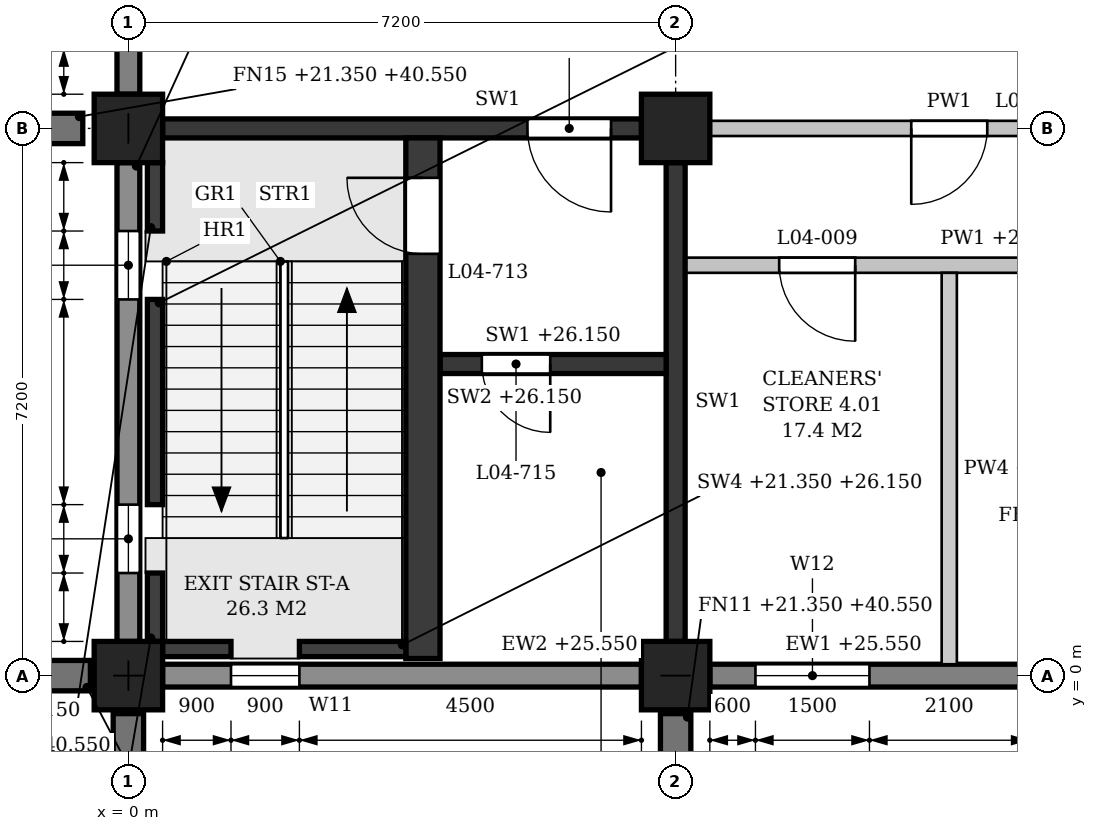
"""IFC4 building model, lengths in metres.
Left out: names, types, materials, properties, quantities, classifications, styles, units other than length and angle.
Written with IfcOpenShell. Run it as: python <this file> out.ifc"""

import sys

from ifc_helpers import new_model, si_unit, direction, frame, frame_2d, origin, origin_2d, place, context, subcontext, project, spatial, polyline, rectangle, outline, extrude, element, fill, save


model = new_model("IFC4")
c1 = context("Model", 3, precision=1e-05, world=origin(), true_north=direction((0.0, 1.0)))
c2 = subcontext(c1, "Body", "Model", "MODEL_VIEW")
j1 = project(units=[si_unit("LENGTHUNIT", "METRE"), si_unit("PLANEANGLEUNIT", "RADIAN")], contexts=[c1])
p1 = place(None, origin())
s1 = spatial("IfcSite", under=j1, at=p1, CompositionType="ELEMENT")
p2 = place(p1, origin())
s2 = spatial("IfcBuilding", under=s1, at=p2, CompositionType="ELEMENT")
p3 = place(p2, frame((0.0, 0.0, 21.6)))
s3 = spatial("IfcBuildingStorey", under=s2, at=p3, CompositionType="ELEMENT", Elevation=21.6)
for number, where, z_axis, x_axis in (
    (1, (0.0, 0.0, 0.0), (0.0, 0.0, 1.0), (1.0, 0.0, 0.0)),
    (2, (0.0, 7.2, 0.0), (0.0, 0.0, 1.0), (1.0, 0.0, 0.0)),
    (3, (7.2, 0.0, 0.0), (0.0, 0.0, 1.0), (1.0, 0.0, 0.0)),
    (4, (7.2, 7.2, 0.0), (0.0, 0.0, 1.0), (1.0, 0.0, 0.0)),
):
    element("IfcColumn", number, at=place(p3, frame(where, z_axis=z_axis, x_axis=x_axis)), inside=s3, PredefinedType="COLUMN", context=c2, shape_type="SweptSolid", body=[
        extrude(rectangle(XDim=0.9, YDim=0.9, at=origin_2d()), origin(), (0.0, 0.0, 1.0), 4.8),
    ])
p4 = place(p3, frame((0.0, 0.45, 0.0), z_axis=(0.0, 0.0, 1.0), x_axis=(0.0, 1.0, 0.0)))
e5 = element("IfcWall", 5, at=p4, inside=s3, PredefinedType="STANDARD", context=c2, shape_type="SweptSolid", body=[
    extrude(rectangle(XDim=6.3, YDim=0.3, at=frame_2d((3.15, 0.0))), origin(), (0.0, 0.0, 1.0), 3.95),
])
p5 = place(p4, frame((0.9, 0.0, 0.9)))
e6 = element("IfcOpeningElement", 6, at=p5, cuts=e5, PredefinedType="OPENING", context=c2, shape_type="SweptSolid", body=[
    extrude(outline(polyline([(0.0, 0.0), (0.9, 0.0), (0.9, 2.05), (0.45, 2.5), (0.0, 2.05), (0.0, 0.0)])), frame((0.0, 0.16, 0.0), z_axis=(0.0, -1.0, 0.0), x_axis=(1.0, 0.0, 0.0)), (0.0, 0.0, 1.0), 0.32),
])
p6 = place(p4, frame((4.5, 0.0, 0.9)))
e7 = element("IfcOpeningElement", 7, at=p6, cuts=e5, PredefinedType="OPENING", context=c2, shape_type="SweptSolid", body=[
    extrude(outline(polyline([(0.0, 0.0), (0.9, 0.0), (0.9, 2.05), (0.45, 2.5), (0.0, 2.05), (0.0, 0.0)])), frame((0.0, 0.16, 0.0), z_axis=(0.0, -1.0, 0.0), x_axis=(1.0, 0.0, 0.0)), (0.0, 0.0, 1.0), 0.32),
])
p7 = place(p3, frame((0.0, 7.65, 0.0), z_axis=(0.0, 0.0, 1.0), x_axis=(0.0, 1.0, 0.0)))
e8 = element("IfcWall", 8, at=p7, inside=s3, PredefinedType="STANDARD", context=c2, shape_type="SweptSolid", body=[
    extrude(rectangle(XDim=6.3, YDim=0.3, at=frame_2d((3.15, 0.0))), origin(), (0.0, 0.0, 1.0), 3.95),
])
p8 = place(p7, frame((0.6, 0.0, 0.9)))
e9 = element("IfcOpeningElement", 9, at=p8, cuts=e8, PredefinedType="OPENING", context=c2, shape_type="SweptSolid", body=[
    extrude(outline(polyline([(0.0, 0.0), (1.5, 0.0), (1.5, 1.75), (0.75, 2.5), (0.0, 1.75), (0.0, 0.0)])), frame((0.0, 0.16, 0.0), z_axis=(0.0, -1.0, 0.0), x_axis=(1.0, 0.0, 0.0)), (0.0, 0.0, 1.0), 0.32),
])
p9 = place(p7, frame((4.2, 0.0, 0.9)))
e10 = element("IfcOpeningElement", 10, at=p9, cuts=e8, PredefinedType="OPENING", context=c2, shape_type="SweptSolid", body=[
    extrude(outline(polyline([(0.0, 0.0), (1.5, 0.0), (1.5, 1.75), (0.75, 2.5), (0.0, 1.75), (0.0, 0.0)])), frame((0.0, 0.16, 0.0), z_axis=(0.0, -1.0, 0.0), x_axis=(1.0, 0.0, 0.0)), (0.0, 0.0, 1.0), 0.32),
])
p10 = place(p3, frame((0.45, 0.0, 0.0), z_axis=(0.0, 0.0, 1.0), x_axis=(1.0, 0.0, 0.0)))
e11 = element("IfcWall", 11, at=p10, inside=s3, PredefinedType="STANDARD", context=c2, shape_type="SweptSolid", body=[
    extrude(rectangle(XDim=6.3, YDim=0.3, at=frame_2d((3.15, 0.0))), origin(), (0.0, 0.0, 1.0), 3.95),
])
p11 = place(p10, frame((0.9, 0.0, 0.9)))
e12 = element("IfcOpeningElement", 12, at=p11, cuts=e11, PredefinedType="OPENING", context=c2, shape_type="SweptSolid", body=[
    extrude(outline(polyline([(0.0, 0.0), (0.9, 0.0), (0.9, 2.05), (0.45, 2.5), (0.0, 2.05), (0.0, 0.0)])), frame((0.0, 0.16, 0.0), z_axis=(0.0, -1.0, 0.0), x_axis=(1.0, 0.0, 0.0)), (0.0, 0.0, 1.0), 0.32),
])
p12 = place(p3, frame((7.65, 0.0, 0.0), z_axis=(0.0, 0.0, 1.0), x_axis=(1.0, 0.0, 0.0)))
e13 = element("IfcWall", 13, at=p12, inside=s3, PredefinedType="STANDARD", context=c2, shape_type="SweptSolid", body=[
    extrude(rectangle(XDim=6.3, YDim=0.3, at=frame_2d((3.15, 0.0))), origin(), (0.0, 0.0, 1.0), 3.95),
])
p13 = place(p12, frame((0.6, 0.0, 0.9)))
e14 = element("IfcOpeningElement", 14, at=p13, cuts=e13, PredefinedType="OPENING", context=c2, shape_type="SweptSolid", body=[
    extrude(outline(polyline([(0.0, 0.0), (1.5, 0.0), (1.5, 1.75), (0.75, 2.5), (0.0, 1.75), (0.0, 0.0)])), frame((0.0, 0.16, 0.0), z_axis=(0.0, -1.0, 0.0), x_axis=(1.0, 0.0, 0.0)), (0.0, 0.0, 1.0), 0.32),
])
p14 = place(p12, frame((4.2, 0.0, 0.9)))
e15 = element("IfcOpeningElement", 15, at=p14, cuts=e13, PredefinedType="OPENING", context=c2, shape_type="SweptSolid", body=[
    extrude(outline(polyline([(0.0, 0.0), (1.5, 0.0), (1.5, 1.75), (0.75, 2.5), (0.0, 1.75), (0.0, 0.0)])), frame((0.0, 0.16, 0.0), z_axis=(0.0, -1.0, 0.0), x_axis=(1.0, 0.0, 0.0)), (0.0, 0.0, 1.0), 0.32),
])
for number, where, z_axis, x_axis in (
    (16, (-0.5, 0.0, -0.25), (0.0, 0.0, 1.0), (-1.0, 0.0, 0.0)),
    (17, (0.0, -0.5, -0.25), (0.0, 0.0, 1.0), (0.0, -1.0, 0.0)),
    (18, (-0.6, 7.2, -0.25), (0.0, 0.0, 1.0), (-1.0, 0.0, 0.0)),
    (19, (7.2, -0.5, -0.25), (0.0, 0.0, 1.0), (0.0, -1.0, 0.0)),
):
    element("IfcWall", number, at=place(p3, frame(where, z_axis=z_axis, x_axis=x_axis)), inside=s3, PredefinedType="POLYGONAL", context=c2, shape_type="SweptSolid", body=[
        extrude(outline(polyline([(0.85, 0.0), (0.85, 18.9), (0.65, 19.2), (0.0, 19.2), (0.0, 0.0), (0.85, 0.0)])), frame((0.0, 0.2, 0.0), z_axis=(0.0, -1.0, 0.0), x_axis=(1.0, 0.0, 0.0)), (0.0, 0.0, 1.0), 0.4),
    ])
p15 = place(p3, frame((0.45, 7.2, 0.0), z_axis=(0.0, 0.0, 1.0), x_axis=(1.0, 0.0, 0.0)))
e20 = element("IfcWall", 20, at=p15, inside=s3, PredefinedType="SHEAR", context=c2, shape_type="SweptSolid", body=[
    extrude(rectangle(XDim=6.3, YDim=0.25, at=frame_2d((3.15, 0.0))), origin(), (0.0, 0.0, 1.0), 3.8),
])
p16 = place(p15, frame((4.8, 0.0, 0.0)))
e21 = element("IfcOpeningElement", 21, at=p16, cuts=e20, PredefinedType="OPENING", context=c2, shape_type="SweptSolid", body=[
    extrude(rectangle(XDim=1.1, YDim=2.1, at=frame_2d((0.55, 1.05))), frame((0.0, 0.135, 0.0), z_axis=(0.0, -1.0, 0.0), x_axis=(1.0, 0.0, 0.0)), (0.0, 0.0, 1.0), 0.27),
])
p17 = place(p3, frame((7.2, 0.45, 0.0), z_axis=(0.0, 0.0, 1.0), x_axis=(0.0, 1.0, 0.0)))
e22 = element("IfcWall", 22, at=p17, inside=s3, PredefinedType="SHEAR", context=c2, shape_type="SweptSolid", body=[
    extrude(rectangle(XDim=6.3, YDim=0.25, at=frame_2d((3.15, 0.0))), origin(), (0.0, 0.0, 1.0), 3.8),
])
p18 = place(p3, frame((0.35, 0.45, -0.25), z_axis=(0.0, 0.0, 1.0), x_axis=(0.0, 1.0, 0.0)))
e23 = element("IfcWall", 23, at=p18, inside=s3, PredefinedType="SHEAR", context=c2, shape_type="SweptSolid", body=[
    extrude(rectangle(XDim=0.9, YDim=0.2, at=frame_2d((0.45, 0.0))), origin(), (0.0, 0.0, 1.0), 4.8),
])
p19 = place(p3, frame((0.35, 2.25, -0.25), z_axis=(0.0, 0.0, 1.0), x_axis=(0.0, 1.0, 0.0)))
e24 = element("IfcWall", 24, at=p19, inside=s3, PredefinedType="SHEAR", context=c2, shape_type="SweptSolid", body=[
    extrude(rectangle(XDim=2.7, YDim=0.2, at=frame_2d((1.35, 0.0))), origin(), (0.0, 0.0, 1.0), 4.8),
])
p20 = place(p3, frame((0.35, 5.85, -0.25), z_axis=(0.0, 0.0, 1.0), x_axis=(0.0, 1.0, 0.0)))
e25 = element("IfcWall", 25, at=p20, inside=s3, PredefinedType="SHEAR", context=c2, shape_type="SweptSolid", body=[
    extrude(rectangle(XDim=0.9, YDim=0.2, at=frame_2d((0.45, 0.0))), origin(), (0.0, 0.0, 1.0), 4.8),
])
p21 = place(p3, frame((0.45, 0.35, -0.25), z_axis=(0.0, 0.0, 1.0), x_axis=(1.0, 0.0, 0.0)))
e26 = element("IfcWall", 26, at=p21, inside=s3, PredefinedType="SHEAR", context=c2, shape_type="SweptSolid", body=[
    extrude(rectangle(XDim=0.9, YDim=0.2, at=frame_2d((0.45, 0.0))), origin(), (0.0, 0.0, 1.0), 4.8),
])
p22 = place(p3, frame((2.25, 0.35, -0.25), z_axis=(0.0, 0.0, 1.0), x_axis=(1.0, 0.0, 0.0)))
e27 = element("IfcWall", 27, at=p22, inside=s3, PredefinedType="SHEAR", context=c2, shape_type="SweptSolid", body=[
    extrude(rectangle(XDim=1.4, YDim=0.2, at=frame_2d((0.7, 0.0))), origin(), (0.0, 0.0, 1.0), 4.8),
])
p23 = place(p3, frame((3.875, 0.225, 0.0), z_axis=(0.0, 0.0, 1.0), x_axis=(0.0, 1.0, 0.0)))
e28 = element("IfcWall", 28, at=p23, inside=s3, PredefinedType="SHEAR", context=c2, shape_type="SweptSolid", body=[
    extrude(rectangle(XDim=6.85, YDim=0.45, at=frame_2d((3.425, 0.0))), origin(), (0.0, 0.0, 1.0), 4.55),
])
p24 = place(p23, frame((5.325, 0.0, 0.0)))
e29 = element("IfcOpeningElement", 29, at=p24, cuts=e28, PredefinedType="OPENING", context=c2, shape_type="SweptSolid", body=[
    extrude(rectangle(XDim=1.0, YDim=2.1, at=frame_2d((0.5, 1.05))), frame((0.0, 0.235, 0.0), z_axis=(0.0, -1.0, 0.0), x_axis=(1.0, 0.0, 0.0)), (0.0, 0.0, 1.0), 0.47),
])
p25 = place(p3, frame((4.1, 4.1, 0.0), z_axis=(0.0, 0.0, 1.0), x_axis=(1.0, 0.0, 0.0)))
e30 = element("IfcWall", 30, at=p25, inside=s3, PredefinedType="SHEAR", context=c2, shape_type="SweptSolid", body=[
    extrude(rectangle(XDim=2.975, YDim=0.25, at=frame_2d((1.487, 0.0))), origin(), (0.0, 0.0, 1.0), 4.55),
])
p26 = place(p25, frame((0.55, 0.0, 0.0)))
e31 = element("IfcOpeningElement", 31, at=p26, cuts=e30, PredefinedType="OPENING", context=c2, shape_type="SweptSolid", body=[
    extrude(rectangle(XDim=0.9, YDim=2.1, at=frame_2d((0.45, 1.05))), frame((0.0, 0.135, 0.0), z_axis=(0.0, -1.0, 0.0), x_axis=(1.0, 0.0, 0.0)), (0.0, 0.0, 1.0), 0.27),
])
p27 = place(p3, frame((7.325, 5.4, 0.0), z_axis=(0.0, 0.0, 1.0), x_axis=(1.0, 0.0, 0.0)))
e32 = element("IfcWall", 32, at=p27, inside=s3, PredefinedType="PARTITIONING", context=c2, shape_type="SweptSolid", body=[
    extrude(outline(polyline([(0.0, 0.0), (14.15, 0.0), (14.15, 3.8), (14.025, 3.8), (14.025, 4.55), (7.325, 4.55), (7.325, 3.8), (6.825, 3.8), (6.825, 4.55), (0.125, 4.55), (0.125, 3.8), (0.0, 3.8), (0.0, 0.0)])), frame((0.0, 0.1, 0.0), z_axis=(0.0, -1.0, 0.0), x_axis=(1.0, 0.0, 0.0)), (0.0, 0.0, 1.0), 0.2),
])
p28 = place(p27, frame((1.238, 0.0, 0.0)))
e33 = element("IfcOpeningElement", 33, at=p28, cuts=e32, PredefinedType="OPENING", context=c2, shape_type="SweptSolid", body=[
    extrude(rectangle(XDim=1.0, YDim=2.1, at=frame_2d((0.5, 1.05))), frame((0.0, 0.11, 0.0), z_axis=(0.0, -1.0, 0.0), x_axis=(1.0, 0.0, 0.0)), (0.0, 0.0, 1.0), 0.22),
])
p29 = place(p27, frame((4.775, 0.0, 0.0)))
e34 = element("IfcOpeningElement", 34, at=p29, cuts=e32, PredefinedType="OPENING", context=c2, shape_type="SweptSolid", body=[
    extrude(rectangle(XDim=1.0, YDim=2.1, at=frame_2d((0.5, 1.05))), frame((0.0, 0.11, 0.0), z_axis=(0.0, -1.0, 0.0), x_axis=(1.0, 0.0, 0.0)), (0.0, 0.0, 1.0), 0.22),
])
p30 = place(p27, frame((8.375, 0.0, 0.0)))
e35 = element("IfcOpeningElement", 35, at=p30, cuts=e32, PredefinedType="OPENING", context=c2, shape_type="SweptSolid", body=[
    extrude(rectangle(XDim=1.0, YDim=2.1, at=frame_2d((0.5, 1.05))), frame((0.0, 0.11, 0.0), z_axis=(0.0, -1.0, 0.0), x_axis=(1.0, 0.0, 0.0)), (0.0, 0.0, 1.0), 0.22),
])
p31 = place(p27, frame((11.913, 0.0, 0.0)))
e36 = element("IfcOpeningElement", 36, at=p31, cuts=e32, PredefinedType="OPENING", context=c2, shape_type="SweptSolid", body=[
    extrude(rectangle(XDim=1.0, YDim=2.1, at=frame_2d((0.5, 1.05))), frame((0.0, 0.11, 0.0), z_axis=(0.0, -1.0, 0.0), x_axis=(1.0, 0.0, 0.0)), (0.0, 0.0, 1.0), 0.22),
])
p32 = place(p3, frame((7.65, 7.2, 0.0), z_axis=(0.0, 0.0, 1.0), x_axis=(1.0, 0.0, 0.0)))
e37 = element("IfcWall", 37, at=p32, inside=s3, PredefinedType="PARTITIONING", context=c2, shape_type="SweptSolid", body=[
    extrude(rectangle(XDim=6.3, YDim=0.2, at=frame_2d((3.15, 0.0))), origin(), (0.0, 0.0, 1.0), 3.8),
])
p33 = place(p32, frame((2.65, 0.0, 0.0)))
e38 = element("IfcOpeningElement", 38, at=p33, cuts=e37, PredefinedType="OPENING", context=c2, shape_type="SweptSolid", body=[
    extrude(rectangle(XDim=1.0, YDim=2.1, at=frame_2d((0.5, 1.05))), frame((0.0, 0.11, 0.0), z_axis=(0.0, -1.0, 0.0), x_axis=(1.0, 0.0, 0.0)), (0.0, 0.0, 1.0), 0.22),
])
p34 = place(p3, frame((10.8, 0.15, 0.0), z_axis=(0.0, 0.0, 1.0), x_axis=(0.0, 1.0, 0.0)))
e39 = element("IfcWall", 39, at=p34, inside=s3, PredefinedType="PARTITIONING", context=c2, shape_type="SweptSolid", body=[
    extrude(outline(polyline([(0.0, 0.0), (5.15, 0.0), (5.15, 4.55), (0.1, 4.55), (0.1, 3.95), (0.0, 3.95), (0.0, 0.0)])), frame((0.0, 0.1, 0.0), z_axis=(0.0, -1.0, 0.0), x_axis=(1.0, 0.0, 0.0)), (0.0, 0.0, 1.0), 0.2),
])
p35 = place(p11, origin())
e40 = element("IfcWindow", 40, at=p35, inside=s3, PartitioningType="SINGLE_PANEL", PredefinedType="WINDOW", context=c2, shape_type="SweptSolid", body=[
    extrude(outline(polyline([(0.0, 0.0), (0.9, 0.0), (0.9, 2.05), (0.45, 2.5), (0.0, 2.05), (0.0, 0.0)])), frame((0.0, 0.03, 0.0), z_axis=(0.0, -1.0, 0.0), x_axis=(1.0, 0.0, 0.0)), (0.0, 0.0, 1.0), 0.06),
])
fill(e12, e40)
p36 = place(p13, origin())
e41 = element("IfcWindow", 41, at=p36, inside=s3, PartitioningType="SINGLE_PANEL", PredefinedType="WINDOW", context=c2, shape_type="SweptSolid", body=[
    extrude(outline(polyline([(0.0, 0.0), (1.5, 0.0), (1.5, 1.75), (0.75, 2.5), (0.0, 1.75), (0.0, 0.0)])), frame((0.0, 0.03, 0.0), z_axis=(0.0, -1.0, 0.0), x_axis=(1.0, 0.0, 0.0)), (0.0, 0.0, 1.0), 0.06),
])
fill(e14, e41)
p37 = place(p5, origin())
e42 = element("IfcWindow", 42, at=p37, inside=s3, PartitioningType="SINGLE_PANEL", PredefinedType="WINDOW", context=c2, shape_type="SweptSolid", body=[
    extrude(outline(polyline([(0.0, 0.0), (0.9, 0.0), (0.9, 2.05), (0.45, 2.5), (0.0, 2.05), (0.0, 0.0)])), frame((0.0, 0.03, 0.0), z_axis=(0.0, -1.0, 0.0), x_axis=(1.0, 0.0, 0.0)), (0.0, 0.0, 1.0), 0.06),
])
fill(e6, e42)
p38 = place(p6, origin())
e43 = element("IfcWindow", 43, at=p38, inside=s3, PartitioningType="SINGLE_PANEL", PredefinedType="WINDOW", context=c2, shape_type="SweptSolid", body=[
    extrude(outline(polyline([(0.0, 0.0), (0.9, 0.0), (0.9, 2.05), (0.45, 2.5), (0.0, 2.05), (0.0, 0.0)])), frame((0.0, 0.03, 0.0), z_axis=(0.0, -1.0, 0.0), x_axis=(1.0, 0.0, 0.0)), (0.0, 0.0, 1.0), 0.06),
])
fill(e7, e43)
p39 = place(p24, origin())
e44 = element("IfcDoor", 44, at=p39, inside=s3, OperationType="SINGLE_SWING_RIGHT", PredefinedType="DOOR", context=c2, shape_type="SweptSolid", body=[
    extrude(rectangle(XDim=1.0, YDim=2.1, at=frame_2d((0.5, 1.05))), frame((0.0, 0.025, 0.0), z_axis=(0.0, -1.0, 0.0), x_axis=(1.0, 0.0, 0.0)), (0.0, 0.0, 1.0), 0.05),
])
fill(e29, e44)
p40 = place(p16, frame((1.1, 0.0, 0.0), z_axis=(0.0, 0.0, 1.0), x_axis=(-1.0, 0.0, 0.0)))
e45 = element("IfcDoor", 45, at=p40, inside=s3, OperationType="SINGLE_SWING_LEFT", PredefinedType="DOOR", context=c2, shape_type="SweptSolid", body=[
    extrude(rectangle(XDim=1.1, YDim=2.1, at=frame_2d((0.55, 1.05))), frame((0.0, 0.025, 0.0), z_axis=(0.0, -1.0, 0.0), x_axis=(1.0, 0.0, 0.0)), (0.0, 0.0, 1.0), 0.05),
])
fill(e21, e45)
p41 = place(p26, frame((0.9, 0.0, 0.0), z_axis=(0.0, 0.0, 1.0), x_axis=(-1.0, 0.0, 0.0)))
e46 = element("IfcDoor", 46, at=p41, inside=s3, OperationType="SINGLE_SWING_LEFT", PredefinedType="DOOR", context=c2, shape_type="SweptSolid", body=[
    extrude(rectangle(XDim=0.9, YDim=2.1, at=frame_2d((0.45, 1.05))), frame((0.0, 0.025, 0.0), z_axis=(0.0, -1.0, 0.0), x_axis=(1.0, 0.0, 0.0)), (0.0, 0.0, 1.0), 0.05),
])
fill(e31, e46)
p42 = place(p33, frame((1.0, 0.0, 0.0), z_axis=(0.0, 0.0, 1.0), x_axis=(-1.0, 0.0, 0.0)))
e47 = element("IfcDoor", 47, at=p42, inside=s3, OperationType="SINGLE_SWING_RIGHT", PredefinedType="DOOR", context=c2, shape_type="SweptSolid", body=[
    extrude(rectangle(XDim=1.0, YDim=2.1, at=frame_2d((0.5, 1.05))), frame((0.0, 0.025, 0.0), z_axis=(0.0, -1.0, 0.0), x_axis=(1.0, 0.0, 0.0)), (0.0, 0.0, 1.0), 0.05),
])
fill(e38, e47)
p43 = place(p28, frame((1.0, 0.0, 0.0), z_axis=(0.0, 0.0, 1.0), x_axis=(-1.0, 0.0, 0.0)))
e48 = element("IfcDoor", 48, at=p43, inside=s3, OperationType="SINGLE_SWING_LEFT", PredefinedType="DOOR", context=c2, shape_type="SweptSolid", body=[
    extrude(rectangle(XDim=1.0, YDim=2.1, at=frame_2d((0.5, 1.05))), frame((0.0, 0.025, 0.0), z_axis=(0.0, -1.0, 0.0), x_axis=(1.0, 0.0, 0.0)), (0.0, 0.0, 1.0), 0.05),
])
fill(e33, e48)
save(model, sys.argv[1])
